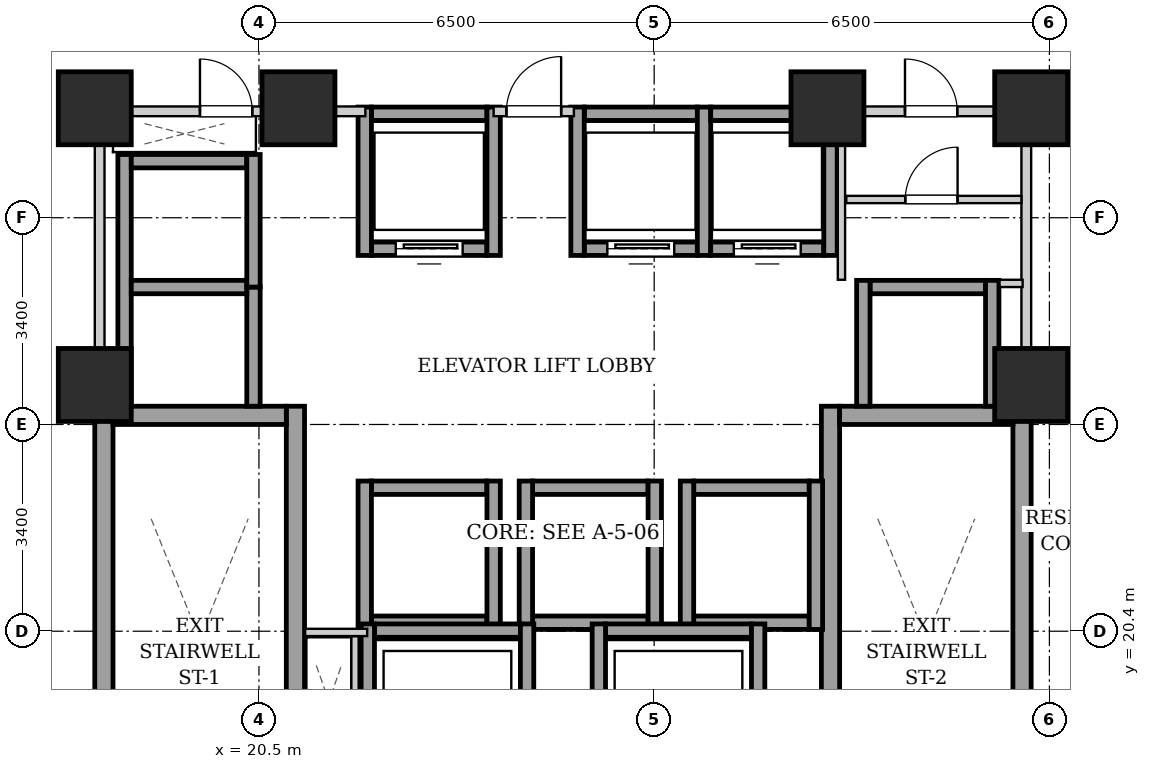
"""IFC4 building model, lengths in metres.
Left out: names, types, materials, properties, quantities, classifications, styles, units other than length and angle.
Written with IfcOpenShell. Run it as: python <this file> out.ifc"""

import sys

from ifc_helpers import new_model, si_unit, direction, frame, frame_2d, origin, origin_2d, place, context, subcontext, project, spatial, rectangle, extrude, element, fill, save


model = new_model("IFC4")
c1 = context("Model", 3, precision=1e-05, world=origin(), true_north=direction((0.0, 1.0)))
c2 = subcontext(c1, "Body", "Model", "MODEL_VIEW")
j1 = project(units=[si_unit("LENGTHUNIT", "METRE"), si_unit("PLANEANGLEUNIT", "RADIAN")], contexts=[c1])
p1 = place(None, origin())
s1 = spatial("IfcSite", under=j1, at=p1, CompositionType="ELEMENT")
p2 = place(p1, origin())
s2 = spatial("IfcBuilding", under=s1, at=p2, CompositionType="ELEMENT")
p3 = place(p2, frame((0.0, 0.0, 57.8)))
s3 = spatial("IfcBuildingStorey", under=s2, at=p3, CompositionType="ELEMENT", Elevation=57.8)
for number, where, z_axis, x_axis in (
    (1, (17.8, 29.0, 0.0), (0.0, 0.0, 1.0), (1.0, 0.0, 0.0)),
    (2, (21.15, 29.0, 0.0), (0.0, 0.0, 1.0), (1.0, 0.0, 0.0)),
    (3, (29.85, 29.0, 0.0), (0.0, 0.0, 1.0), (1.0, 0.0, 0.0)),
    (4, (33.2, 29.0, 0.0), (0.0, 0.0, 1.0), (1.0, 0.0, 0.0)),
    (5, (17.8, 24.45, 0.0), (0.0, 0.0, 1.0), (1.0, 0.0, 0.0)),
    (6, (33.2, 24.45, 0.0), (0.0, 0.0, 1.0), (1.0, 0.0, 0.0)),
):
    element("IfcColumn", number, at=place(p3, frame(where, z_axis=z_axis, x_axis=x_axis)), inside=s3, PredefinedType="COLUMN", context=c2, shape_type="SweptSolid", body=[
        extrude(rectangle(XDim=1.2, YDim=1.2, at=origin_2d()), origin(), (0.0, 0.0, 1.0), 3.2),
    ])
for number, where, z_axis, x_axis in (
    (7, (17.95, 15.1, 0.0), (0.0, 0.0, 1.0), (0.0, 1.0, 0.0)),
    (8, (21.1, 15.1, 0.0), (0.0, 0.0, 1.0), (0.0, 1.0, 0.0)),
):
    element("IfcWall", number, at=place(p3, frame(where, z_axis=z_axis, x_axis=x_axis)), inside=s3, PredefinedType="SHEAR", context=c2, shape_type="SweptSolid", body=[
        extrude(rectangle(XDim=9.0, YDim=0.3, at=frame_2d((4.5, 0.0))), origin(), (0.0, 0.0, 1.0), 2.94),
    ])
p4 = place(p3, frame((18.1, 23.95, 0.0), z_axis=(0.0, 0.0, 1.0), x_axis=(1.0, 0.0, 0.0)))
e9 = element("IfcWall", 9, at=p4, inside=s3, PredefinedType="SHEAR", context=c2, shape_type="SweptSolid", body=[
    extrude(rectangle(XDim=2.85, YDim=0.3, at=frame_2d((1.425, 0.0))), origin(), (0.0, 0.0, 1.0), 2.94),
])
for number, where, z_axis, x_axis in (
    (10, (29.9, 15.1, 0.0), (0.0, 0.0, 1.0), (0.0, 1.0, 0.0)),
    (11, (33.05, 15.1, 0.0), (0.0, 0.0, 1.0), (0.0, 1.0, 0.0)),
):
    element("IfcWall", number, at=place(p3, frame(where, z_axis=z_axis, x_axis=x_axis)), inside=s3, PredefinedType="SHEAR", context=c2, shape_type="SweptSolid", body=[
        extrude(rectangle(XDim=9.0, YDim=0.3, at=frame_2d((4.5, 0.0))), origin(), (0.0, 0.0, 1.0), 2.94),
    ])
p5 = place(p3, frame((30.05, 23.95, 0.0), z_axis=(0.0, 0.0, 1.0), x_axis=(1.0, 0.0, 0.0)))
e12 = element("IfcWall", 12, at=p5, inside=s3, PredefinedType="SHEAR", context=c2, shape_type="SweptSolid", body=[
    extrude(rectangle(XDim=2.85, YDim=0.3, at=frame_2d((1.425, 0.0))), origin(), (0.0, 0.0, 1.0), 2.94),
])
p6 = place(p3, frame((22.35, 26.69, 0.0), z_axis=(0.0, 0.0, 1.0), x_axis=(1.0, 0.0, 0.0)))
e13 = element("IfcWall", 13, at=p6, inside=s3, PredefinedType="SHEAR", context=c2, shape_type="SweptSolid", body=[
    extrude(rectangle(XDim=1.9, YDim=0.22, at=frame_2d((0.95, 0.0))), origin(), (0.0, 0.0, 1.0), 2.94),
])
p7 = place(p6, frame((0.4, 0.0, 0.0)))
e14 = element("IfcOpeningElement", 14, at=p7, cuts=e13, PredefinedType="OPENING", context=c2, shape_type="SweptSolid", body=[
    extrude(rectangle(XDim=1.1, YDim=2.15, at=frame_2d((0.55, 1.075))), frame((0.0, 0.12, 0.0), z_axis=(0.0, -1.0, 0.0), x_axis=(1.0, 0.0, 0.0)), (0.0, 0.0, 1.0), 0.24),
])
p8 = place(p3, frame((22.35, 28.91, 0.0), z_axis=(0.0, 0.0, 1.0), x_axis=(1.0, 0.0, 0.0)))
e15 = element("IfcWall", 15, at=p8, inside=s3, PredefinedType="SHEAR", context=c2, shape_type="SweptSolid", body=[
    extrude(rectangle(XDim=1.9, YDim=0.22, at=frame_2d((0.95, 0.0))), origin(), (0.0, 0.0, 1.0), 2.94),
])
for number, where, z_axis, x_axis in (
    (16, (22.24, 26.58, 0.0), (0.0, 0.0, 1.0), (0.0, 1.0, 0.0)),
    (17, (24.36, 26.58, 0.0), (0.0, 0.0, 1.0), (0.0, 1.0, 0.0)),
):
    element("IfcWall", number, at=place(p3, frame(where, z_axis=z_axis, x_axis=x_axis)), inside=s3, PredefinedType="SHEAR", context=c2, shape_type="SweptSolid", body=[
        extrude(rectangle(XDim=2.44, YDim=0.22, at=frame_2d((1.22, 0.0))), origin(), (0.0, 0.0, 1.0), 2.94),
    ])
p9 = place(p3, frame((25.85, 26.69, 0.0), z_axis=(0.0, 0.0, 1.0), x_axis=(1.0, 0.0, 0.0)))
e18 = element("IfcWall", 18, at=p9, inside=s3, PredefinedType="SHEAR", context=c2, shape_type="SweptSolid", body=[
    extrude(rectangle(XDim=1.86, YDim=0.22, at=frame_2d((0.93, 0.0))), origin(), (0.0, 0.0, 1.0), 2.94),
])
p10 = place(p9, frame((0.38, 0.0, 0.0)))
e19 = element("IfcOpeningElement", 19, at=p10, cuts=e18, PredefinedType="OPENING", context=c2, shape_type="SweptSolid", body=[
    extrude(rectangle(XDim=1.1, YDim=2.15, at=frame_2d((0.55, 1.075))), frame((0.0, 0.12, 0.0), z_axis=(0.0, -1.0, 0.0), x_axis=(1.0, 0.0, 0.0)), (0.0, 0.0, 1.0), 0.24),
])
p11 = place(p3, frame((25.85, 28.91, 0.0), z_axis=(0.0, 0.0, 1.0), x_axis=(1.0, 0.0, 0.0)))
e20 = element("IfcWall", 20, at=p11, inside=s3, PredefinedType="SHEAR", context=c2, shape_type="SweptSolid", body=[
    extrude(rectangle(XDim=1.86, YDim=0.22, at=frame_2d((0.93, 0.0))), origin(), (0.0, 0.0, 1.0), 2.94),
])
for number, where, z_axis, x_axis in (
    (21, (25.74, 26.58, 0.0), (0.0, 0.0, 1.0), (0.0, 1.0, 0.0)),
    (22, (27.82, 26.58, 0.0), (0.0, 0.0, 1.0), (0.0, 1.0, 0.0)),
):
    element("IfcWall", number, at=place(p3, frame(where, z_axis=z_axis, x_axis=x_axis)), inside=s3, PredefinedType="SHEAR", context=c2, shape_type="SweptSolid", body=[
        extrude(rectangle(XDim=2.44, YDim=0.22, at=frame_2d((1.22, 0.0))), origin(), (0.0, 0.0, 1.0), 2.94),
    ])
p12 = place(p3, frame((27.93, 26.69, 0.0), z_axis=(0.0, 0.0, 1.0), x_axis=(1.0, 0.0, 0.0)))
e23 = element("IfcWall", 23, at=p12, inside=s3, PredefinedType="SHEAR", context=c2, shape_type="SweptSolid", body=[
    extrude(rectangle(XDim=1.86, YDim=0.22, at=frame_2d((0.93, 0.0))), origin(), (0.0, 0.0, 1.0), 2.94),
])
p13 = place(p12, frame((0.38, 0.0, 0.0)))
e24 = element("IfcOpeningElement", 24, at=p13, cuts=e23, PredefinedType="OPENING", context=c2, shape_type="SweptSolid", body=[
    extrude(rectangle(XDim=1.1, YDim=2.15, at=frame_2d((0.55, 1.075))), frame((0.0, 0.12, 0.0), z_axis=(0.0, -1.0, 0.0), x_axis=(1.0, 0.0, 0.0)), (0.0, 0.0, 1.0), 0.24),
])
p14 = place(p3, frame((27.93, 28.91, 0.0), z_axis=(0.0, 0.0, 1.0), x_axis=(1.0, 0.0, 0.0)))
e25 = element("IfcWall", 25, at=p14, inside=s3, PredefinedType="SHEAR", context=c2, shape_type="SweptSolid", body=[
    extrude(rectangle(XDim=1.86, YDim=0.22, at=frame_2d((0.93, 0.0))), origin(), (0.0, 0.0, 1.0), 2.94),
])
p15 = place(p3, frame((29.9, 26.58, 0.0), z_axis=(0.0, 0.0, 1.0), x_axis=(0.0, 1.0, 0.0)))
e26 = element("IfcWall", 26, at=p15, inside=s3, PredefinedType="SHEAR", context=c2, shape_type="SweptSolid", body=[
    extrude(rectangle(XDim=2.44, YDim=0.22, at=frame_2d((1.22, 0.0))), origin(), (0.0, 0.0, 1.0), 2.94),
])
for number, where, z_axis, x_axis in (
    (27, (22.35, 20.54, 0.0), (0.0, 0.0, 1.0), (1.0, 0.0, 0.0)),
    (28, (22.35, 22.76, 0.0), (0.0, 0.0, 1.0), (1.0, 0.0, 0.0)),
):
    element("IfcWall", number, at=place(p3, frame(where, z_axis=z_axis, x_axis=x_axis)), inside=s3, PredefinedType="SHEAR", context=c2, shape_type="SweptSolid", body=[
        extrude(rectangle(XDim=1.9, YDim=0.22, at=frame_2d((0.95, 0.0))), origin(), (0.0, 0.0, 1.0), 2.94),
    ])
for number, where, z_axis, x_axis in (
    (29, (22.24, 20.43, 0.0), (0.0, 0.0, 1.0), (0.0, 1.0, 0.0)),
    (30, (24.36, 20.43, 0.0), (0.0, 0.0, 1.0), (0.0, 1.0, 0.0)),
):
    element("IfcWall", number, at=place(p3, frame(where, z_axis=z_axis, x_axis=x_axis)), inside=s3, PredefinedType="SHEAR", context=c2, shape_type="SweptSolid", body=[
        extrude(rectangle(XDim=2.44, YDim=0.22, at=frame_2d((1.22, 0.0))), origin(), (0.0, 0.0, 1.0), 2.94),
    ])
for number, where, z_axis, x_axis in (
    (31, (25.0, 20.54, 0.0), (0.0, 0.0, 1.0), (1.0, 0.0, 0.0)),
    (32, (25.0, 22.76, 0.0), (0.0, 0.0, 1.0), (1.0, 0.0, 0.0)),
):
    element("IfcWall", number, at=place(p3, frame(where, z_axis=z_axis, x_axis=x_axis)), inside=s3, PredefinedType="SHEAR", context=c2, shape_type="SweptSolid", body=[
        extrude(rectangle(XDim=1.9, YDim=0.22, at=frame_2d((0.95, 0.0))), origin(), (0.0, 0.0, 1.0), 2.94),
    ])
for number, where, z_axis, x_axis in (
    (33, (24.89, 20.43, 0.0), (0.0, 0.0, 1.0), (0.0, 1.0, 0.0)),
    (34, (27.01, 20.43, 0.0), (0.0, 0.0, 1.0), (0.0, 1.0, 0.0)),
):
    element("IfcWall", number, at=place(p3, frame(where, z_axis=z_axis, x_axis=x_axis)), inside=s3, PredefinedType="SHEAR", context=c2, shape_type="SweptSolid", body=[
        extrude(rectangle(XDim=2.44, YDim=0.22, at=frame_2d((1.22, 0.0))), origin(), (0.0, 0.0, 1.0), 2.94),
    ])
for number, where, z_axis, x_axis in (
    (35, (27.65, 20.54, 0.0), (0.0, 0.0, 1.0), (1.0, 0.0, 0.0)),
    (36, (27.65, 22.76, 0.0), (0.0, 0.0, 1.0), (1.0, 0.0, 0.0)),
):
    element("IfcWall", number, at=place(p3, frame(where, z_axis=z_axis, x_axis=x_axis)), inside=s3, PredefinedType="SHEAR", context=c2, shape_type="SweptSolid", body=[
        extrude(rectangle(XDim=1.9, YDim=0.22, at=frame_2d((0.95, 0.0))), origin(), (0.0, 0.0, 1.0), 2.94),
    ])
for number, where, z_axis, x_axis in (
    (37, (27.54, 20.43, 0.0), (0.0, 0.0, 1.0), (0.0, 1.0, 0.0)),
    (38, (29.66, 20.43, 0.0), (0.0, 0.0, 1.0), (0.0, 1.0, 0.0)),
):
    element("IfcWall", number, at=place(p3, frame(where, z_axis=z_axis, x_axis=x_axis)), inside=s3, PredefinedType="SHEAR", context=c2, shape_type="SweptSolid", body=[
        extrude(rectangle(XDim=2.44, YDim=0.22, at=frame_2d((1.22, 0.0))), origin(), (0.0, 0.0, 1.0), 2.94),
    ])
p16 = place(p3, frame((18.29, 24.1, 0.0), z_axis=(0.0, 0.0, 1.0), x_axis=(0.0, 1.0, 0.0)))
e39 = element("IfcWall", 39, at=p16, inside=s3, PredefinedType="SHEAR", context=c2, shape_type="SweptSolid", body=[
    extrude(rectangle(XDim=4.14, YDim=0.22, at=frame_2d((2.07, 0.0))), origin(), (0.0, 0.0, 1.0), 2.94),
])
p17 = place(p3, frame((20.41, 24.1, 0.0), z_axis=(0.0, 0.0, 1.0), x_axis=(0.0, 1.0, 0.0)))
e40 = element("IfcWall", 40, at=p17, inside=s3, PredefinedType="SHEAR", context=c2, shape_type="SweptSolid", body=[
    extrude(rectangle(XDim=1.96, YDim=0.22, at=frame_2d((0.98, 0.0))), origin(), (0.0, 0.0, 1.0), 2.94),
])
for number, where, z_axis, x_axis in (
    (41, (18.4, 26.06, 0.0), (0.0, 0.0, 1.0), (1.0, 0.0, 0.0)),
    (42, (18.4, 28.13, 0.0), (0.0, 0.0, 1.0), (1.0, 0.0, 0.0)),
):
    element("IfcWall", number, at=place(p3, frame(where, z_axis=z_axis, x_axis=x_axis)), inside=s3, PredefinedType="SHEAR", context=c2, shape_type="SweptSolid", body=[
        extrude(rectangle(XDim=1.9, YDim=0.22, at=frame_2d((0.95, 0.0))), origin(), (0.0, 0.0, 1.0), 2.94),
    ])
p18 = place(p3, frame((20.41, 26.06, 0.0), z_axis=(0.0, 0.0, 1.0), x_axis=(0.0, 1.0, 0.0)))
e43 = element("IfcWall", 43, at=p18, inside=s3, PredefinedType="SHEAR", context=c2, shape_type="SweptSolid", body=[
    extrude(rectangle(XDim=2.18, YDim=0.22, at=frame_2d((1.09, 0.0))), origin(), (0.0, 0.0, 1.0), 2.94),
])
p19 = place(p3, frame((30.55, 26.06, 0.0), z_axis=(0.0, 0.0, 1.0), x_axis=(1.0, 0.0, 0.0)))
e44 = element("IfcWall", 44, at=p19, inside=s3, PredefinedType="SHEAR", context=c2, shape_type="SweptSolid", body=[
    extrude(rectangle(XDim=1.9, YDim=0.22, at=frame_2d((0.95, 0.0))), origin(), (0.0, 0.0, 1.0), 2.94),
])
for number, where, z_axis, x_axis in (
    (45, (30.44, 24.1, 0.0), (0.0, 0.0, 1.0), (0.0, 1.0, 0.0)),
    (46, (32.56, 24.1, 0.0), (0.0, 0.0, 1.0), (0.0, 1.0, 0.0)),
):
    element("IfcWall", number, at=place(p3, frame(where, z_axis=z_axis, x_axis=x_axis)), inside=s3, PredefinedType="SHEAR", context=c2, shape_type="SweptSolid", body=[
        extrude(rectangle(XDim=2.07, YDim=0.22, at=frame_2d((1.035, 0.0))), origin(), (0.0, 0.0, 1.0), 2.94),
    ])
p20 = place(p3, frame((22.4, 20.41, 0.0), z_axis=(0.0, 0.0, 1.0), x_axis=(1.0, 0.0, 0.0)))
e47 = element("IfcWall", 47, at=p20, inside=s3, PredefinedType="SHEAR", context=c2, shape_type="SweptSolid", body=[
    extrude(rectangle(XDim=2.4, YDim=0.22, at=frame_2d((1.2, 0.0))), origin(), (0.0, 0.0, 1.0), 2.94),
])
for number, where, z_axis, x_axis in (
    (48, (22.29, 17.98, 0.0), (0.0, 0.0, 1.0), (0.0, 1.0, 0.0)),
    (49, (24.91, 17.98, 0.0), (0.0, 0.0, 1.0), (0.0, 1.0, 0.0)),
):
    element("IfcWall", number, at=place(p3, frame(where, z_axis=z_axis, x_axis=x_axis)), inside=s3, PredefinedType="SHEAR", context=c2, shape_type="SweptSolid", body=[
        extrude(rectangle(XDim=2.54, YDim=0.22, at=frame_2d((1.27, 0.0))), origin(), (0.0, 0.0, 1.0), 2.94),
    ])
p21 = place(p3, frame((26.2, 20.41, 0.0), z_axis=(0.0, 0.0, 1.0), x_axis=(1.0, 0.0, 0.0)))
e50 = element("IfcWall", 50, at=p21, inside=s3, PredefinedType="SHEAR", context=c2, shape_type="SweptSolid", body=[
    extrude(rectangle(XDim=2.4, YDim=0.22, at=frame_2d((1.2, 0.0))), origin(), (0.0, 0.0, 1.0), 2.94),
])
for number, where, z_axis, x_axis in (
    (51, (26.09, 17.98, 0.0), (0.0, 0.0, 1.0), (0.0, 1.0, 0.0)),
    (52, (28.71, 17.98, 0.0), (0.0, 0.0, 1.0), (0.0, 1.0, 0.0)),
):
    element("IfcWall", number, at=place(p3, frame(where, z_axis=z_axis, x_axis=x_axis)), inside=s3, PredefinedType="SHEAR", context=c2, shape_type="SweptSolid", body=[
        extrude(rectangle(XDim=2.54, YDim=0.22, at=frame_2d((1.27, 0.0))), origin(), (0.0, 0.0, 1.0), 2.94),
    ])
for number, where, z_axis, x_axis in (
    (53, (17.88, 24.12, 0.0), (0.0, 0.0, 1.0), (0.0, 1.0, 0.0)),
    (54, (33.12, 24.12, 0.0), (0.0, 0.0, 1.0), (0.0, 1.0, 0.0)),
):
    element("IfcWall", number, at=place(p3, frame(where, z_axis=z_axis, x_axis=x_axis)), inside=s3, PredefinedType="PARTITIONING", context=c2, shape_type="SweptSolid", body=[
        extrude(rectangle(XDim=4.76, YDim=0.16, at=frame_2d((2.38, 0.0))), origin(), (0.0, 0.0, 1.0), 2.275),
    ])
p22 = place(p3, frame((24.36, 28.95, 0.0), z_axis=(0.0, 0.0, 1.0), x_axis=(1.0, 0.0, 0.0)))
e55 = element("IfcWall", 55, at=p22, inside=s3, PredefinedType="PARTITIONING", context=c2, shape_type="SweptSolid", body=[
    extrude(rectangle(XDim=1.32, YDim=0.16, at=frame_2d((0.66, 0.0))), origin(), (0.0, 0.0, 1.0), 2.232),
])
p23 = place(p22, frame((0.21, 0.0, 0.0)))
e56 = element("IfcOpeningElement", 56, at=p23, cuts=e55, PredefinedType="OPENING", context=c2, shape_type="SweptSolid", body=[
    extrude(rectangle(XDim=0.9, YDim=2.05, at=frame_2d((0.45, 1.025))), frame((0.0, 0.09, 0.0), z_axis=(0.0, -1.0, 0.0), x_axis=(1.0, 0.0, 0.0)), (0.0, 0.0, 1.0), 0.18),
])
p24 = place(p3, frame((17.96, 28.95, 0.0), z_axis=(0.0, 0.0, 1.0), x_axis=(1.0, 0.0, 0.0)))
e57 = element("IfcWall", 57, at=p24, inside=s3, PredefinedType="PARTITIONING", context=c2, shape_type="SweptSolid", body=[
    extrude(rectangle(XDim=4.29, YDim=0.16, at=frame_2d((2.145, 0.0))), origin(), (0.0, 0.0, 1.0), 2.232),
])
p25 = place(p24, frame((1.57, 0.0, 0.0)))
e58 = element("IfcOpeningElement", 58, at=p25, cuts=e57, PredefinedType="OPENING", context=c2, shape_type="SweptSolid", body=[
    extrude(rectangle(XDim=0.86, YDim=2.05, at=frame_2d((0.43, 1.025))), frame((0.0, 0.09, 0.0), z_axis=(0.0, -1.0, 0.0), x_axis=(1.0, 0.0, 0.0)), (0.0, 0.0, 1.0), 0.18),
])
p26 = place(p3, frame((22.08, 18.2, 0.0), z_axis=(0.0, 0.0, 1.0), x_axis=(0.0, 1.0, 0.0)))
e59 = element("IfcWall", 59, at=p26, inside=s3, PredefinedType="PARTITIONING", context=c2, shape_type="SweptSolid", body=[
    extrude(rectangle(XDim=2.12, YDim=0.12, at=frame_2d((1.06, 0.0))), origin(), (0.0, 0.0, 1.0), 2.94),
])
p27 = place(p3, frame((22.28, 20.38, 0.0), z_axis=(0.0, 0.0, 1.0), x_axis=(-1.0, 0.0, 0.0)))
e60 = element("IfcWall", 60, at=p27, inside=s3, PredefinedType="PARTITIONING", context=c2, shape_type="SweptSolid", body=[
    extrude(rectangle(XDim=1.02, YDim=0.12, at=frame_2d((0.51, 0.0))), origin(), (0.0, 0.0, 1.0), 2.94),
])
p28 = place(p3, frame((30.08, 26.18, 0.0), z_axis=(0.0, 0.0, 1.0), x_axis=(0.0, 1.0, 0.0)))
e61 = element("IfcWall", 61, at=p28, inside=s3, PredefinedType="PARTITIONING", context=c2, shape_type="SweptSolid", body=[
    extrude(rectangle(XDim=2.68, YDim=0.12, at=frame_2d((1.34, 0.0))), origin(), (0.0, 0.0, 1.0), 2.94),
])
p29 = place(p3, frame((32.68, 26.12, 0.0), z_axis=(0.0, 0.0, 1.0), x_axis=(1.0, 0.0, 0.0)))
e62 = element("IfcWall", 62, at=p29, inside=s3, PredefinedType="PARTITIONING", context=c2, shape_type="SweptSolid", body=[
    extrude(rectangle(XDim=0.38, YDim=0.12, at=frame_2d((0.19, 0.0))), origin(), (0.0, 0.0, 1.0), 2.94),
])
p30 = place(p3, frame((30.16, 27.5, 0.0), z_axis=(0.0, 0.0, 1.0), x_axis=(1.0, 0.0, 0.0)))
e63 = element("IfcWall", 63, at=p30, inside=s3, PredefinedType="PARTITIONING", context=c2, shape_type="SweptSolid", body=[
    extrude(rectangle(XDim=2.88, YDim=0.12, at=frame_2d((1.44, 0.0))), origin(), (0.0, 0.0, 1.0), 2.94),
])
p31 = place(p30, frame((0.97, 0.0, 0.0)))
e64 = element("IfcOpeningElement", 64, at=p31, cuts=e63, PredefinedType="OPENING", context=c2, shape_type="SweptSolid", body=[
    extrude(rectangle(XDim=0.86, YDim=2.05, at=frame_2d((0.43, 1.025))), frame((0.0, 0.07, 0.0), z_axis=(0.0, -1.0, 0.0), x_axis=(1.0, 0.0, 0.0)), (0.0, 0.0, 1.0), 0.14),
])
p32 = place(p3, frame((30.08, 28.95, 0.0), z_axis=(0.0, 0.0, 1.0), x_axis=(1.0, 0.0, 0.0)))
e65 = element("IfcWall", 65, at=p32, inside=s3, PredefinedType="PARTITIONING", context=c2, shape_type="SweptSolid", body=[
    extrude(rectangle(XDim=2.96, YDim=0.16, at=frame_2d((1.48, 0.0))), origin(), (0.0, 0.0, 1.0), 2.94),
])
p33 = place(p32, frame((1.045, 0.0, 0.0)))
e66 = element("IfcOpeningElement", 66, at=p33, cuts=e65, PredefinedType="OPENING", context=c2, shape_type="SweptSolid", body=[
    extrude(rectangle(XDim=0.86, YDim=2.05, at=frame_2d((0.43, 1.025))), frame((0.0, 0.09, 0.0), z_axis=(0.0, -1.0, 0.0), x_axis=(1.0, 0.0, 0.0)), (0.0, 0.0, 1.0), 0.18),
])
p34 = place(p7, origin())
e67 = element("IfcDoor", 67, at=p34, inside=s3, OperationType="SLIDING_TO_LEFT", PredefinedType="DOOR", context=c2, shape_type="SweptSolid", body=[
    extrude(rectangle(XDim=1.1, YDim=2.15, at=frame_2d((0.55, 1.075))), frame((0.0, 0.025, 0.0), z_axis=(0.0, -1.0, 0.0), x_axis=(1.0, 0.0, 0.0)), (0.0, 0.0, 1.0), 0.05),
])
fill(e14, e67)
p35 = place(p10, origin())
e68 = element("IfcDoor", 68, at=p35, inside=s3, OperationType="SLIDING_TO_LEFT", PredefinedType="DOOR", context=c2, shape_type="SweptSolid", body=[
    extrude(rectangle(XDim=1.1, YDim=2.15, at=frame_2d((0.55, 1.075))), frame((0.0, 0.025, 0.0), z_axis=(0.0, -1.0, 0.0), x_axis=(1.0, 0.0, 0.0)), (0.0, 0.0, 1.0), 0.05),
])
fill(e19, e68)
p36 = place(p13, origin())
e69 = element("IfcDoor", 69, at=p36, inside=s3, OperationType="SLIDING_TO_LEFT", PredefinedType="DOOR", context=c2, shape_type="SweptSolid", body=[
    extrude(rectangle(XDim=1.1, YDim=2.15, at=frame_2d((0.55, 1.075))), frame((0.0, 0.025, 0.0), z_axis=(0.0, -1.0, 0.0), x_axis=(1.0, 0.0, 0.0)), (0.0, 0.0, 1.0), 0.05),
])
fill(e24, e69)
p37 = place(p23, origin())
e70 = element("IfcDoor", 70, at=p37, inside=s3, OperationType="SINGLE_SWING_RIGHT", PredefinedType="DOOR", context=c2, shape_type="SweptSolid", body=[
    extrude(rectangle(XDim=0.9, YDim=2.05, at=frame_2d((0.45, 1.025))), frame((0.0, 0.025, 0.0), z_axis=(0.0, -1.0, 0.0), x_axis=(1.0, 0.0, 0.0)), (0.0, 0.0, 1.0), 0.05),
])
fill(e56, e70)
p38 = place(p25, origin())
e71 = element("IfcDoor", 71, at=p38, inside=s3, OperationType="SINGLE_SWING_LEFT", PredefinedType="DOOR", context=c2, shape_type="SweptSolid", body=[
    extrude(rectangle(XDim=0.86, YDim=2.05, at=frame_2d((0.43, 1.025))), frame((0.0, 0.025, 0.0), z_axis=(0.0, -1.0, 0.0), x_axis=(1.0, 0.0, 0.0)), (0.0, 0.0, 1.0), 0.05),
])
fill(e58, e71)
p39 = place(p31, origin())
e72 = element("IfcDoor", 72, at=p39, inside=s3, OperationType="SINGLE_SWING_RIGHT", PredefinedType="DOOR", context=c2, shape_type="SweptSolid", body=[
    extrude(rectangle(XDim=0.86, YDim=2.05, at=frame_2d((0.43, 1.025))), frame((0.0, 0.025, 0.0), z_axis=(0.0, -1.0, 0.0), x_axis=(1.0, 0.0, 0.0)), (0.0, 0.0, 1.0), 0.05),
])
fill(e64, e72)
p40 = place(p33, origin())
e73 = element("IfcDoor", 73, at=p40, inside=s3, OperationType="SINGLE_SWING_LEFT", PredefinedType="DOOR", context=c2, shape_type="SweptSolid", body=[
    extrude(rectangle(XDim=0.86, YDim=2.05, at=frame_2d((0.43, 1.025))), frame((0.0, 0.025, 0.0), z_axis=(0.0, -1.0, 0.0), x_axis=(1.0, 0.0, 0.0)), (0.0, 0.0, 1.0), 0.05),
])
fill(e66, e73)
save(model, sys.argv[1])
